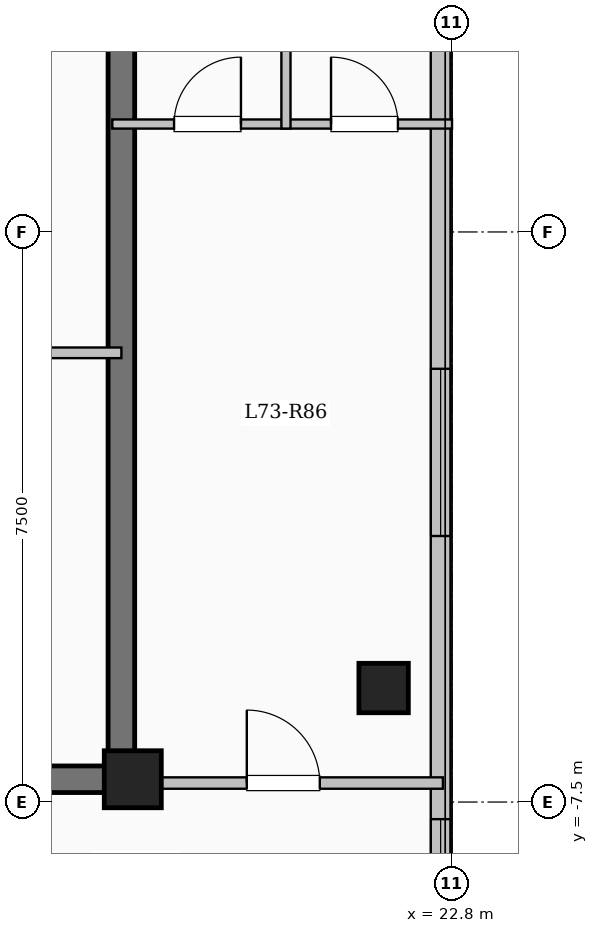
"""IFC4 building model, lengths in metres.
Left out: names, types, materials, properties, quantities, classifications, styles, units other than length and angle.
Written with IfcOpenShell. Run it as: python <this file> out.ifc"""

import sys

from ifc_helpers import new_model, si_unit, direction, frame, frame_2d, origin, origin_2d, place, context, subcontext, project, spatial, rectangle, extrude, element, fill, save


model = new_model("IFC4")
c1 = context("Model", 3, precision=1e-05, world=origin(), true_north=direction((0.0, 1.0)))
c2 = subcontext(c1, "Body", "Model", "MODEL_VIEW")
j1 = project(units=[si_unit("LENGTHUNIT", "METRE"), si_unit("PLANEANGLEUNIT", "RADIAN")], contexts=[c1])
p1 = place(None, origin())
s1 = spatial("IfcSite", under=j1, at=p1, CompositionType="ELEMENT")
p2 = place(p1, origin())
s2 = spatial("IfcBuilding", under=s1, at=p2, CompositionType="ELEMENT")
p3 = place(p2, frame((0.0, 0.0, 268.3)))
s3 = spatial("IfcBuildingStorey", under=s2, at=p3, CompositionType="ELEMENT", Elevation=268.3)
p4 = place(p3, frame((18.6, -7.2, 0.0), z_axis=(0.0, 0.0, 1.0), x_axis=(1.0, 0.0, 0.0)))
e1 = element("IfcColumn", 1, at=p4, inside=s3, PredefinedType="COLUMN", context=c2, shape_type="SweptSolid", body=[
    extrude(rectangle(XDim=0.75, YDim=0.75, at=origin_2d()), origin(), (0.0, 0.0, 1.0), 3.35),
])
p5 = place(p3, frame((21.9, -6.0, 0.0), z_axis=(0.0, 0.0, 1.0), x_axis=(1.0, 0.0, 0.0)))
e2 = element("IfcColumn", 2, at=p5, inside=s3, PredefinedType="COLUMN", context=c2, shape_type="SweptSolid", body=[
    extrude(rectangle(XDim=0.65, YDim=0.65, at=origin_2d()), origin(), (0.0, 0.0, 1.0), 3.35),
])
p6 = place(p3, frame((22.65, 17.55, 0.0), z_axis=(0.0, 0.0, 1.0), x_axis=(0.0, -1.0, 0.0)))
e3 = element("IfcWall", 3, at=p6, inside=s3, PredefinedType="SOLIDWALL", context=c2, shape_type="SweptSolid", body=[
    extrude(rectangle(XDim=35.1, YDim=0.26, at=frame_2d((17.55, 0.0))), origin(), (0.0, 0.0, 1.0), 3.05),
])
p7 = place(p6, frame((1.525, 0.0, 0.9)))
e4 = element("IfcOpeningElement", 4, at=p7, cuts=e3, PredefinedType="OPENING", context=c2, shape_type="SweptSolid", body=[
    extrude(rectangle(XDim=2.0, YDim=1.7, at=frame_2d((1.0, 0.85))), frame((0.0, 0.14, 0.0), z_axis=(0.0, -1.0, 0.0), x_axis=(1.0, 0.0, 0.0)), (0.0, 0.0, 1.0), 0.28),
])
p8 = place(p6, frame((5.425, 0.0, 0.95)))
e5 = element("IfcOpeningElement", 5, at=p8, cuts=e3, PredefinedType="OPENING", context=c2, shape_type="SweptSolid", body=[
    extrude(rectangle(XDim=1.0, YDim=1.5, at=frame_2d((0.5, 0.75))), frame((0.0, 0.14, 0.0), z_axis=(0.0, -1.0, 0.0), x_axis=(1.0, 0.0, 0.0)), (0.0, 0.0, 1.0), 0.28),
])
p9 = place(p6, frame((8.675, 0.0, 0.9)))
e6 = element("IfcOpeningElement", 6, at=p9, cuts=e3, PredefinedType="OPENING", context=c2, shape_type="SweptSolid", body=[
    extrude(rectangle(XDim=2.0, YDim=1.7, at=frame_2d((1.0, 0.85))), frame((0.0, 0.14, 0.0), z_axis=(0.0, -1.0, 0.0), x_axis=(1.0, 0.0, 0.0)), (0.0, 0.0, 1.0), 0.28),
])
p10 = place(p6, frame((13.5, 0.0, 0.9)))
e7 = element("IfcOpeningElement", 7, at=p10, cuts=e3, PredefinedType="OPENING", context=c2, shape_type="SweptSolid", body=[
    extrude(rectangle(XDim=1.65, YDim=1.6, at=frame_2d((0.825, 0.8))), frame((0.0, 0.14, 0.0), z_axis=(0.0, -1.0, 0.0), x_axis=(1.0, 0.0, 0.0)), (0.0, 0.0, 1.0), 0.28),
])
p11 = place(p6, frame((19.35, 0.0, 0.9)))
e8 = element("IfcOpeningElement", 8, at=p11, cuts=e3, PredefinedType="OPENING", context=c2, shape_type="SweptSolid", body=[
    extrude(rectangle(XDim=2.2, YDim=1.75, at=frame_2d((1.1, 0.875))), frame((0.0, 0.14, 0.0), z_axis=(0.0, -1.0, 0.0), x_axis=(1.0, 0.0, 0.0)), (0.0, 0.0, 1.0), 0.28),
])
p12 = place(p6, frame((25.275, 0.0, 0.95)))
e9 = element("IfcOpeningElement", 9, at=p12, cuts=e3, PredefinedType="OPENING", context=c2, shape_type="SweptSolid", body=[
    extrude(rectangle(XDim=1.2, YDim=1.5, at=frame_2d((0.6, 0.75))), frame((0.0, 0.14, 0.0), z_axis=(0.0, -1.0, 0.0), x_axis=(1.0, 0.0, 0.0)), (0.0, 0.0, 1.0), 0.28),
])
p13 = place(p6, frame((29.925, 0.0, 0.9)))
e10 = element("IfcOpeningElement", 10, at=p13, cuts=e3, PredefinedType="OPENING", context=c2, shape_type="SweptSolid", body=[
    extrude(rectangle(XDim=2.2, YDim=1.75, at=frame_2d((1.1, 0.875))), frame((0.0, 0.14, 0.0), z_axis=(0.0, -1.0, 0.0), x_axis=(1.0, 0.0, 0.0)), (0.0, 0.0, 1.0), 0.28),
])
p14 = place(p3, frame((18.45, -7.375, 0.0), z_axis=(0.0, 0.0, 1.0), x_axis=(0.0, 1.0, 0.0)))
e11 = element("IfcWall", 11, at=p14, inside=s3, PredefinedType="SHEAR", context=c2, shape_type="SweptSolid", body=[
    extrude(rectangle(XDim=14.05, YDim=0.35, at=frame_2d((7.025, 0.0))), origin(), (0.0, 0.0, 1.0), 3.35),
])
p15 = place(p3, frame((12.625, -7.2, 0.0), z_axis=(0.0, 0.0, 1.0), x_axis=(1.0, 0.0, 0.0)))
e12 = element("IfcWall", 12, at=p15, inside=s3, PredefinedType="SHEAR", context=c2, shape_type="SweptSolid", body=[
    extrude(rectangle(XDim=6.0, YDim=0.35, at=frame_2d((3.0, 0.0))), origin(), (0.0, 0.0, 1.0), 3.35),
])
p16 = place(p3, frame((15.4, -1.59, 0.0), z_axis=(0.0, 0.0, 1.0), x_axis=(1.0, 0.0, 0.0)))
e13 = element("IfcWall", 13, at=p16, inside=s3, PredefinedType="PARTITIONING", context=c2, shape_type="SweptSolid", body=[
    extrude(rectangle(XDim=3.05, YDim=0.14, at=frame_2d((1.525, 0.0))), origin(), (0.0, 0.0, 1.0), 3.05),
])
p17 = place(p16, frame((1.05, 0.0, 0.0)))
e14 = element("IfcOpeningElement", 14, at=p17, cuts=e13, PredefinedType="OPENING", context=c2, shape_type="SweptSolid", body=[
    extrude(rectangle(XDim=0.9, YDim=2.08, at=frame_2d((0.45, 1.04))), frame((0.0, 0.08, 0.0), z_axis=(0.0, -1.0, 0.0), x_axis=(1.0, 0.0, 0.0)), (0.0, 0.0, 1.0), 0.16),
])
p18 = place(p3, frame((18.45, -7.25, 0.0), z_axis=(0.0, 0.0, 1.0), x_axis=(1.0, 0.0, 0.0)))
e15 = element("IfcWall", 15, at=p18, inside=s3, PredefinedType="PARTITIONING", context=c2, shape_type="SweptSolid", body=[
    extrude(rectangle(XDim=4.23, YDim=0.15, at=frame_2d((2.115, 0.0))), origin(), (0.0, 0.0, 1.0), 3.05),
])
p19 = place(p18, frame((1.65, 0.0, 0.0)))
e16 = element("IfcOpeningElement", 16, at=p19, cuts=e15, PredefinedType="OPENING", context=c2, shape_type="SweptSolid", body=[
    extrude(rectangle(XDim=0.96, YDim=2.15, at=frame_2d((0.48, 1.075))), frame((0.0, 0.085, 0.0), z_axis=(0.0, -1.0, 0.0), x_axis=(1.0, 0.0, 0.0)), (0.0, 0.0, 1.0), 0.17),
])
p20 = place(p3, frame((18.33, 1.42, 0.0), z_axis=(0.0, 0.0, 1.0), x_axis=(1.0, 0.0, 0.0)))
e17 = element("IfcWall", 17, at=p20, inside=s3, PredefinedType="PARTITIONING", context=c2, shape_type="SweptSolid", body=[
    extrude(rectangle(XDim=4.47, YDim=0.12, at=frame_2d((2.235, 0.0))), origin(), (0.0, 0.0, 1.0), 3.05),
])
p21 = place(p20, frame((0.813, 0.0, 0.0)))
e18 = element("IfcOpeningElement", 18, at=p21, cuts=e17, PredefinedType="OPENING", context=c2, shape_type="SweptSolid", body=[
    extrude(rectangle(XDim=0.88, YDim=2.1, at=frame_2d((0.44, 1.05))), frame((0.0, 0.07, 0.0), z_axis=(0.0, -1.0, 0.0), x_axis=(1.0, 0.0, 0.0)), (0.0, 0.0, 1.0), 0.14),
])
p22 = place(p20, frame((2.878, 0.0, 0.0)))
e19 = element("IfcOpeningElement", 19, at=p22, cuts=e17, PredefinedType="OPENING", context=c2, shape_type="SweptSolid", body=[
    extrude(rectangle(XDim=0.88, YDim=2.1, at=frame_2d((0.44, 1.05))), frame((0.0, 0.07, 0.0), z_axis=(0.0, -1.0, 0.0), x_axis=(1.0, 0.0, 0.0)), (0.0, 0.0, 1.0), 0.14),
])
p23 = place(p3, frame((20.615, 1.36, 0.0), z_axis=(0.0, 0.0, 1.0), x_axis=(0.0, 1.0, 0.0)))
e20 = element("IfcWall", 20, at=p23, inside=s3, PredefinedType="PARTITIONING", context=c2, shape_type="SweptSolid", body=[
    extrude(rectangle(XDim=3.58, YDim=0.12, at=frame_2d((1.79, 0.0))), origin(), (0.0, 0.0, 1.0), 3.05),
])
p24 = place(p11, origin())
e21 = element("IfcWindow", 21, at=p24, inside=s3, PartitioningType="SINGLE_PANEL", PredefinedType="WINDOW", context=c2, shape_type="SweptSolid", body=[
    extrude(rectangle(XDim=2.2, YDim=1.75, at=frame_2d((1.1, 0.875))), frame((0.0, 0.03, 0.0), z_axis=(0.0, -1.0, 0.0), x_axis=(1.0, 0.0, 0.0)), (0.0, 0.0, 1.0), 0.06),
])
fill(e8, e21)
p25 = place(p12, origin())
e22 = element("IfcWindow", 22, at=p25, inside=s3, PartitioningType="SINGLE_PANEL", PredefinedType="WINDOW", context=c2, shape_type="SweptSolid", body=[
    extrude(rectangle(XDim=1.2, YDim=1.5, at=frame_2d((0.6, 0.75))), frame((0.0, 0.03, 0.0), z_axis=(0.0, -1.0, 0.0), x_axis=(1.0, 0.0, 0.0)), (0.0, 0.0, 1.0), 0.06),
])
fill(e9, e22)
p26 = place(p19, origin())
e23 = element("IfcDoor", 23, at=p26, inside=s3, OperationType="SINGLE_SWING_LEFT", PredefinedType="DOOR", context=c2, shape_type="SweptSolid", body=[
    extrude(rectangle(XDim=0.96, YDim=2.15, at=frame_2d((0.48, 1.075))), frame((0.0, 0.025, 0.0), z_axis=(0.0, -1.0, 0.0), x_axis=(1.0, 0.0, 0.0)), (0.0, 0.0, 1.0), 0.05),
])
fill(e16, e23)
p27 = place(p21, origin())
e24 = element("IfcDoor", 24, at=p27, inside=s3, OperationType="SINGLE_SWING_RIGHT", PredefinedType="DOOR", context=c2, shape_type="SweptSolid", body=[
    extrude(rectangle(XDim=0.88, YDim=2.1, at=frame_2d((0.44, 1.05))), frame((0.0, 0.025, 0.0), z_axis=(0.0, -1.0, 0.0), x_axis=(1.0, 0.0, 0.0)), (0.0, 0.0, 1.0), 0.05),
])
fill(e18, e24)
p28 = place(p22, origin())
e25 = element("IfcDoor", 25, at=p28, inside=s3, OperationType="SINGLE_SWING_LEFT", PredefinedType="DOOR", context=c2, shape_type="SweptSolid", body=[
    extrude(rectangle(XDim=0.88, YDim=2.1, at=frame_2d((0.44, 1.05))), frame((0.0, 0.025, 0.0), z_axis=(0.0, -1.0, 0.0), x_axis=(1.0, 0.0, 0.0)), (0.0, 0.0, 1.0), 0.05),
])
fill(e19, e25)
save(model, sys.argv[1])
